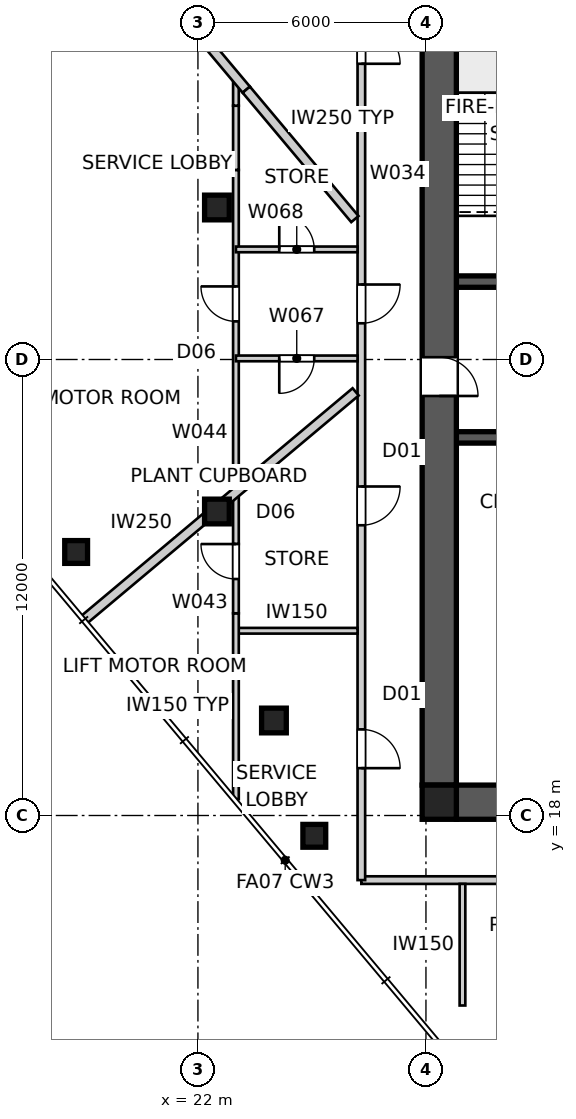
"""IFC4 building model, lengths in metres.
Left out: names, types, materials, properties, quantities, classifications, styles, units other than length and angle.
Written with IfcOpenShell. Run it as: python <this file> out.ifc"""

import sys

from ifc_helpers import new_model, si_unit, direction, frame, frame_2d, origin, origin_2d, place, context, subcontext, project, spatial, polyline, rectangle, outline, extrude, element, fill, save


model = new_model("IFC4")
c1 = context("Model", 3, precision=1e-05, world=origin(), true_north=direction((0.0, 1.0)))
c2 = subcontext(c1, "Body", "Model", "MODEL_VIEW")
j1 = project(units=[si_unit("LENGTHUNIT", "METRE"), si_unit("PLANEANGLEUNIT", "RADIAN")], contexts=[c1])
p1 = place(None, origin())
s1 = spatial("IfcSite", under=j1, at=p1, CompositionType="ELEMENT")
p2 = place(p1, origin())
s2 = spatial("IfcBuilding", under=s1, at=p2, CompositionType="ELEMENT")
p3 = place(p2, frame((0.0, 0.0, 304.3)))
s3 = spatial("IfcBuildingStorey", under=s2, at=p3, CompositionType="ELEMENT", Elevation=304.3)
p4 = place(p3, frame((51.2, 18.35, 0.0), z_axis=(0.0, 0.0, 1.0), x_axis=(-1.0, 0.0, 0.0)))
e1 = element("IfcWall", 1, at=p4, inside=s3, PredefinedType="SHEAR", context=c2, shape_type="SweptSolid", body=[
    extrude(outline(polyline([(0.0, -0.45), (22.4, -0.45), (22.4, -0.025), (22.85, -0.025), (22.85, 0.025), (22.4, 0.025), (22.4, 0.45), (0.0, 0.45), (0.0, 0.025), (-0.45, 0.025), (-0.45, -0.025), (0.0, -0.025), (0.0, -0.45)])), origin(), (0.0, 0.0, 1.0), 4.5),
])
p5 = place(p3, frame((28.35, 41.2, 0.0), z_axis=(0.0, 0.0, 1.0), x_axis=(0.0, -1.0, 0.0)))
e2 = element("IfcWall", 2, at=p5, inside=s3, PredefinedType="SHEAR", context=c2, shape_type="SweptSolid", body=[
    extrude(outline(polyline([(0.0, -0.45), (22.4, -0.45), (22.4, -0.025), (22.85, -0.025), (22.85, 0.025), (22.4, 0.025), (22.4, 0.45), (0.0, 0.45), (0.0, 0.025), (-0.45, 0.025), (-0.45, -0.025), (0.0, -0.025), (0.0, -0.45)])), origin(), (0.0, 0.0, 1.0), 4.5),
])
p6 = place(p5, frame((11.14, 0.0, 0.0)))
e3 = element("IfcOpeningElement", 3, at=p6, cuts=e2, PredefinedType="OPENING", context=c2, shape_type="SweptSolid", body=[
    extrude(rectangle(XDim=1.02, YDim=2.4, at=frame_2d((0.51, 1.2))), frame((0.0, 0.46, 0.0), z_axis=(0.0, -1.0, 0.0), x_axis=(1.0, 0.0, 0.0)), (0.0, 0.0, 1.0), 0.92),
])
p7 = place(p3, frame((28.8, 32.05, 0.0), z_axis=(0.0, 0.0, 1.0), x_axis=(1.0, 0.0, 0.0)))
e4 = element("IfcWall", 4, at=p7, inside=s3, PredefinedType="SHEAR", context=c2, shape_type="SweptSolid", body=[
    extrude(rectangle(XDim=22.4, YDim=0.3, at=frame_2d((11.2, 0.0))), origin(), (0.0, 0.0, 1.0), 4.5),
])
p8 = place(p7, frame((19.04, 0.0, 0.0)))
e5 = element("IfcOpeningElement", 5, at=p8, cuts=e4, PredefinedType="OPENING", context=c2, shape_type="SweptSolid", body=[
    extrude(rectangle(XDim=0.92, YDim=2.1, at=frame_2d((0.46, 1.05))), frame((0.0, 0.16, 0.0), z_axis=(0.0, -1.0, 0.0), x_axis=(1.0, 0.0, 0.0)), (0.0, 0.0, 1.0), 0.32),
])
p9 = place(p7, frame((1.265, 0.0, 0.0)))
e6 = element("IfcOpeningElement", 6, at=p9, cuts=e4, PredefinedType="OPENING", context=c2, shape_type="SweptSolid", body=[
    extrude(rectangle(XDim=1.02, YDim=2.1, at=frame_2d((0.51, 1.05))), frame((0.0, 0.16, 0.0), z_axis=(0.0, -1.0, 0.0), x_axis=(1.0, 0.0, 0.0)), (0.0, 0.0, 1.0), 0.32),
])
p10 = place(p7, frame((4.015, 0.0, 0.0)))
e7 = element("IfcOpeningElement", 7, at=p10, cuts=e4, PredefinedType="OPENING", context=c2, shape_type="SweptSolid", body=[
    extrude(rectangle(XDim=0.92, YDim=2.1, at=frame_2d((0.46, 1.05))), frame((0.0, 0.16, 0.0), z_axis=(0.0, -1.0, 0.0), x_axis=(1.0, 0.0, 0.0)), (0.0, 0.0, 1.0), 0.32),
])
p11 = place(p7, frame((6.565, 0.0, 0.0)))
e8 = element("IfcOpeningElement", 8, at=p11, cuts=e4, PredefinedType="OPENING", context=c2, shape_type="SweptSolid", body=[
    extrude(rectangle(XDim=0.92, YDim=2.1, at=frame_2d((0.46, 1.05))), frame((0.0, 0.16, 0.0), z_axis=(0.0, -1.0, 0.0), x_axis=(1.0, 0.0, 0.0)), (0.0, 0.0, 1.0), 0.32),
])
p12 = place(p7, frame((8.89, 0.0, 0.0)))
e9 = element("IfcOpeningElement", 9, at=p12, cuts=e4, PredefinedType="OPENING", context=c2, shape_type="SweptSolid", body=[
    extrude(rectangle(XDim=0.92, YDim=2.1, at=frame_2d((0.46, 1.05))), frame((0.0, 0.16, 0.0), z_axis=(0.0, -1.0, 0.0), x_axis=(1.0, 0.0, 0.0)), (0.0, 0.0, 1.0), 0.32),
])
p13 = place(p7, frame((12.59, 0.0, 0.0)))
e10 = element("IfcOpeningElement", 10, at=p13, cuts=e4, PredefinedType="OPENING", context=c2, shape_type="SweptSolid", body=[
    extrude(rectangle(XDim=0.92, YDim=2.1, at=frame_2d((0.46, 1.05))), frame((0.0, 0.16, 0.0), z_axis=(0.0, -1.0, 0.0), x_axis=(1.0, 0.0, 0.0)), (0.0, 0.0, 1.0), 0.32),
])
p14 = place(p7, frame((14.85, 0.0, 0.0)))
e11 = element("IfcOpeningElement", 11, at=p14, cuts=e4, PredefinedType="OPENING", context=c2, shape_type="SweptSolid", body=[
    extrude(rectangle(XDim=1.1, YDim=2.1, at=frame_2d((0.55, 1.05))), frame((0.0, 0.16, 0.0), z_axis=(0.0, -1.0, 0.0), x_axis=(1.0, 0.0, 0.0)), (0.0, 0.0, 1.0), 0.32),
])
p15 = place(p3, frame((51.2, 27.95, 0.0), z_axis=(0.0, 0.0, 1.0), x_axis=(-1.0, 0.0, 0.0)))
e12 = element("IfcWall", 12, at=p15, inside=s3, PredefinedType="SHEAR", context=c2, shape_type="SweptSolid", body=[
    extrude(rectangle(XDim=22.4, YDim=0.3, at=frame_2d((11.2, 0.0))), origin(), (0.0, 0.0, 1.0), 4.5),
])
p16 = place(p15, frame((19.04, 0.0, 0.0)))
e13 = element("IfcOpeningElement", 13, at=p16, cuts=e12, PredefinedType="OPENING", context=c2, shape_type="SweptSolid", body=[
    extrude(rectangle(XDim=0.92, YDim=2.1, at=frame_2d((0.46, 1.05))), frame((0.0, 0.16, 0.0), z_axis=(0.0, -1.0, 0.0), x_axis=(1.0, 0.0, 0.0)), (0.0, 0.0, 1.0), 0.32),
])
p17 = place(p15, frame((1.265, 0.0, 0.0)))
e14 = element("IfcOpeningElement", 14, at=p17, cuts=e12, PredefinedType="OPENING", context=c2, shape_type="SweptSolid", body=[
    extrude(rectangle(XDim=1.02, YDim=2.1, at=frame_2d((0.51, 1.05))), frame((0.0, 0.16, 0.0), z_axis=(0.0, -1.0, 0.0), x_axis=(1.0, 0.0, 0.0)), (0.0, 0.0, 1.0), 0.32),
])
p18 = place(p15, frame((4.015, 0.0, 0.0)))
e15 = element("IfcOpeningElement", 15, at=p18, cuts=e12, PredefinedType="OPENING", context=c2, shape_type="SweptSolid", body=[
    extrude(rectangle(XDim=0.92, YDim=2.1, at=frame_2d((0.46, 1.05))), frame((0.0, 0.16, 0.0), z_axis=(0.0, -1.0, 0.0), x_axis=(1.0, 0.0, 0.0)), (0.0, 0.0, 1.0), 0.32),
])
p19 = place(p15, frame((12.59, 0.0, 0.0)))
e16 = element("IfcOpeningElement", 16, at=p19, cuts=e12, PredefinedType="OPENING", context=c2, shape_type="SweptSolid", body=[
    extrude(rectangle(XDim=0.92, YDim=2.1, at=frame_2d((0.46, 1.05))), frame((0.0, 0.16, 0.0), z_axis=(0.0, -1.0, 0.0), x_axis=(1.0, 0.0, 0.0)), (0.0, 0.0, 1.0), 0.32),
])
p20 = place(p15, frame((8.89, 0.0, 0.0)))
e17 = element("IfcOpeningElement", 17, at=p20, cuts=e12, PredefinedType="OPENING", context=c2, shape_type="SweptSolid", body=[
    extrude(rectangle(XDim=0.92, YDim=2.1, at=frame_2d((0.46, 1.05))), frame((0.0, 0.16, 0.0), z_axis=(0.0, -1.0, 0.0), x_axis=(1.0, 0.0, 0.0)), (0.0, 0.0, 1.0), 0.32),
])
p21 = place(p15, frame((6.565, 0.0, 0.0)))
e18 = element("IfcOpeningElement", 18, at=p21, cuts=e12, PredefinedType="OPENING", context=c2, shape_type="SweptSolid", body=[
    extrude(rectangle(XDim=0.92, YDim=2.1, at=frame_2d((0.46, 1.05))), frame((0.0, 0.16, 0.0), z_axis=(0.0, -1.0, 0.0), x_axis=(1.0, 0.0, 0.0)), (0.0, 0.0, 1.0), 0.32),
])
p22 = place(p15, frame((14.85, 0.0, 0.0)))
e19 = element("IfcOpeningElement", 19, at=p22, cuts=e12, PredefinedType="OPENING", context=c2, shape_type="SweptSolid", body=[
    extrude(rectangle(XDim=1.1, YDim=2.1, at=frame_2d((0.55, 1.05))), frame((0.0, 0.16, 0.0), z_axis=(0.0, -1.0, 0.0), x_axis=(1.0, 0.0, 0.0)), (0.0, 0.0, 1.0), 0.32),
])
p23 = place(p3, frame((28.35, 18.35, 0.0), z_axis=(0.0, 0.0, 1.0), x_axis=(1.0, 0.0, 0.0)))
e20 = element("IfcColumn", 20, at=p23, inside=s3, PredefinedType="COLUMN", context=c2, shape_type="SweptSolid", body=[
    extrude(rectangle(XDim=0.9, YDim=0.9, at=origin_2d()), origin(), (0.0, 0.0, 1.0), 4.5),
])
for number, where, z_axis, x_axis in (
    (21, (18.795, 24.935, 0.0), (0.0, 0.0, 1.0), (1.0, 0.0, 0.0)),
    (22, (25.062, 17.466, 0.0), (0.0, 0.0, 1.0), (1.0, 0.0, 0.0)),
):
    element("IfcColumn", number, at=place(p3, frame(where, z_axis=z_axis, x_axis=x_axis)), inside=s3, PredefinedType="COLUMN", context=c2, shape_type="SweptSolid", body=[
        extrude(rectangle(XDim=0.6, YDim=0.6, at=origin_2d()), origin(), (0.0, 0.0, 1.0), 4.5),
    ])
for number, where, z_axis, x_axis in (
    (23, (22.5, 34.0, 0.0), (0.0, 0.0, 1.0), (1.0, 0.0, 0.0)),
    (24, (22.5, 26.0, 0.0), (0.0, 0.0, 1.0), (1.0, 0.0, 0.0)),
    (25, (24.0, 20.5, 0.0), (0.0, 0.0, 1.0), (1.0, 0.0, 0.0)),
):
    element("IfcColumn", number, at=place(p3, frame(where, z_axis=z_axis, x_axis=x_axis)), inside=s3, PredefinedType="COLUMN", context=c2, shape_type="SweptSolid", body=[
        extrude(rectangle(XDim=0.65, YDim=0.65, at=origin_2d()), origin(), (0.0, 0.0, 1.0), 4.5),
    ])
p24 = place(p3, frame((26.3, 16.3, 0.0), z_axis=(0.0, 0.0, 1.0), x_axis=(1.0, 0.0, 0.0)))
e26 = element("IfcWall", 26, at=p24, inside=s3, PredefinedType="PARTITIONING", context=c2, shape_type="SweptSolid", body=[
    extrude(rectangle(XDim=27.4, YDim=0.2, at=frame_2d((13.7, 0.0))), origin(), (0.0, 0.0, 1.0), 4.25),
])
p25 = place(p24, frame((22.126, 0.0, 0.0)))
e27 = element("IfcOpeningElement", 27, at=p25, cuts=e26, PredefinedType="OPENING", context=c2, shape_type="SweptSolid", body=[
    extrude(rectangle(XDim=1.02, YDim=2.34, at=frame_2d((0.51, 1.17))), frame((0.0, 0.11, 0.0), z_axis=(0.0, -1.0, 0.0), x_axis=(1.0, 0.0, 0.0)), (0.0, 0.0, 1.0), 0.22),
])
p26 = place(p24, frame((13.395, 0.0, 0.0)))
e28 = element("IfcOpeningElement", 28, at=p26, cuts=e26, PredefinedType="OPENING", context=c2, shape_type="SweptSolid", body=[
    extrude(rectangle(XDim=1.02, YDim=2.34, at=frame_2d((0.51, 1.17))), frame((0.0, 0.11, 0.0), z_axis=(0.0, -1.0, 0.0), x_axis=(1.0, 0.0, 0.0)), (0.0, 0.0, 1.0), 0.22),
])
p27 = place(p24, frame((6.053, 0.0, 0.0)))
e29 = element("IfcOpeningElement", 29, at=p27, cuts=e26, PredefinedType="OPENING", context=c2, shape_type="SweptSolid", body=[
    extrude(rectangle(XDim=1.02, YDim=2.34, at=frame_2d((0.51, 1.17))), frame((0.0, 0.11, 0.0), z_axis=(0.0, -1.0, 0.0), x_axis=(1.0, 0.0, 0.0)), (0.0, 0.0, 1.0), 0.22),
])
p28 = place(p3, frame((26.3, 43.7, 0.0), z_axis=(0.0, 0.0, 1.0), x_axis=(0.0, -1.0, 0.0)))
e30 = element("IfcWall", 30, at=p28, inside=s3, PredefinedType="PARTITIONING", context=c2, shape_type="SweptSolid", body=[
    extrude(rectangle(XDim=27.4, YDim=0.2, at=frame_2d((13.7, 0.0))), origin(), (0.0, 0.0, 1.0), 4.25),
])
p29 = place(p28, frame((4.898, 0.0, 0.0)))
e31 = element("IfcOpeningElement", 31, at=p29, cuts=e30, PredefinedType="OPENING", context=c2, shape_type="SweptSolid", body=[
    extrude(rectangle(XDim=1.02, YDim=2.34, at=frame_2d((0.51, 1.17))), frame((0.0, 0.11, 0.0), z_axis=(0.0, -1.0, 0.0), x_axis=(1.0, 0.0, 0.0)), (0.0, 0.0, 1.0), 0.22),
])
p30 = place(p28, frame((17.042, 0.0, 0.0)))
e32 = element("IfcOpeningElement", 32, at=p30, cuts=e30, PredefinedType="OPENING", context=c2, shape_type="SweptSolid", body=[
    extrude(rectangle(XDim=1.02, YDim=2.34, at=frame_2d((0.51, 1.17))), frame((0.0, 0.11, 0.0), z_axis=(0.0, -1.0, 0.0), x_axis=(1.0, 0.0, 0.0)), (0.0, 0.0, 1.0), 0.22),
])
p31 = place(p28, frame((23.434, 0.0, 0.0)))
e33 = element("IfcOpeningElement", 33, at=p31, cuts=e30, PredefinedType="OPENING", context=c2, shape_type="SweptSolid", body=[
    extrude(rectangle(XDim=1.02, YDim=2.34, at=frame_2d((0.51, 1.17))), frame((0.0, 0.11, 0.0), z_axis=(0.0, -1.0, 0.0), x_axis=(1.0, 0.0, 0.0)), (0.0, 0.0, 1.0), 0.22),
])
p32 = place(p28, frame((11.727, 0.0, 0.0)))
e34 = element("IfcOpeningElement", 34, at=p32, cuts=e30, PredefinedType="OPENING", context=c2, shape_type="SweptSolid", body=[
    extrude(rectangle(XDim=1.02, YDim=2.34, at=frame_2d((0.51, 1.17))), frame((0.0, 0.11, 0.0), z_axis=(0.0, -1.0, 0.0), x_axis=(1.0, 0.0, 0.0)), (0.0, 0.0, 1.0), 0.22),
])
p33 = place(p3, frame((21.146, 39.635, 0.0), z_axis=(0.0, 0.0, 1.0), x_axis=(0.642823301165, -0.766014492995, 0.0)))
e35 = element("IfcWall", 35, at=p33, inside=s3, PredefinedType="PARTITIONING", context=c2, shape_type="SweptSolid", body=[
    extrude(rectangle(XDim=3.308, YDim=0.25, at=frame_2d((1.654, 0.0))), origin(), (0.0, 0.0, 1.0), 3.638),
])
p34 = place(p3, frame((23.272, 37.101, 0.0), z_axis=(0.0, 0.0, 1.0), x_axis=(0.642778620996, -0.766051985436, 0.0)))
e36 = element("IfcWall", 36, at=p34, inside=s3, PredefinedType="PARTITIONING", context=c2, shape_type="SweptSolid", body=[
    extrude(rectangle(XDim=4.446, YDim=0.25, at=frame_2d((2.223, 0.0))), origin(), (0.0, 0.0, 1.0), 4.25),
])
p35 = place(p3, frame((18.993, 23.143, 0.0), z_axis=(0.0, 0.0, 1.0), x_axis=(0.766045019392, 0.64278692291, 0.0)))
e37 = element("IfcWall", 37, at=p35, inside=s3, PredefinedType="PARTITIONING", context=c2, shape_type="SweptSolid", body=[
    extrude(rectangle(XDim=9.343, YDim=0.25, at=frame_2d((4.671, 0.0))), origin(), (0.0, 0.0, 1.0), 4.25),
])
for number, where, z_axis, x_axis in (
    (38, (28.961, 16.2, 0.0), (0.0, 0.0, 1.0), (0.0, -1.0, 0.0)),
    (39, (23.0, 22.862, 0.0), (0.0, 0.0, 1.0), (1.0, 0.0, 0.0)),
):
    element("IfcWall", number, at=place(p3, frame(where, z_axis=z_axis, x_axis=x_axis)), inside=s3, PredefinedType="SOLIDWALL", context=c2, shape_type="SweptSolid", body=[
        extrude(rectangle(XDim=3.2, YDim=0.15, at=frame_2d((1.6, 0.0))), origin(), (0.0, 0.0, 1.0), 4.25),
    ])
p36 = place(p3, frame((23.0, 18.43, 0.0), z_axis=(0.0, 0.0, 1.0), x_axis=(0.0, 1.0, 0.0)))
e40 = element("IfcWall", 40, at=p36, inside=s3, PredefinedType="SOLIDWALL", context=c2, shape_type="SweptSolid", body=[
    extrude(rectangle(XDim=4.892, YDim=0.15, at=frame_2d((2.446, 0.0))), origin(), (0.0, 0.0, 1.0), 4.25),
])
p37 = place(p3, frame((23.0, 23.322, 0.0), z_axis=(0.0, 0.0, 1.0), x_axis=(0.0, 1.0, 0.0)))
e41 = element("IfcWall", 41, at=p37, inside=s3, PredefinedType="SOLIDWALL", context=c2, shape_type="SweptSolid", body=[
    extrude(rectangle(XDim=1.822, YDim=0.15, at=frame_2d((0.911, 0.0))), origin(), (0.0, 0.0, 1.0), 3.25),
])
p38 = place(p37, frame((0.902, 0.0, 0.0)))
e42 = element("IfcOpeningElement", 42, at=p38, cuts=e41, PredefinedType="OPENING", context=c2, shape_type="SweptSolid", body=[
    extrude(rectangle(XDim=0.92, YDim=2.1, at=frame_2d((0.46, 1.05))), frame((0.0, 0.085, 0.0), z_axis=(0.0, -1.0, 0.0), x_axis=(1.0, 0.0, 0.0)), (0.0, 0.0, 1.0), 0.17),
])
p39 = place(p3, frame((23.0, 25.143, 0.0), z_axis=(0.0, 0.0, 1.0), x_axis=(0.0, 1.0, 0.0)))
e43 = element("IfcWall", 43, at=p39, inside=s3, PredefinedType="SOLIDWALL", context=c2, shape_type="SweptSolid", body=[
    extrude(rectangle(XDim=9.845, YDim=0.15, at=frame_2d((4.922, 0.0))), origin(), (0.0, 0.0, 1.0), 4.25),
])
p40 = place(p39, frame((5.86, 0.0, 0.0)))
e44 = element("IfcOpeningElement", 44, at=p40, cuts=e43, PredefinedType="OPENING", context=c2, shape_type="SweptSolid", body=[
    extrude(rectangle(XDim=0.92, YDim=2.1, at=frame_2d((0.46, 1.05))), frame((0.0, 0.085, 0.0), z_axis=(0.0, -1.0, 0.0), x_axis=(1.0, 0.0, 0.0)), (0.0, 0.0, 1.0), 0.17),
])
p41 = place(p3, frame((23.0, 34.988, 0.0), z_axis=(0.0, 0.0, 1.0), x_axis=(0.0, 1.0, 0.0)))
e45 = element("IfcWall", 45, at=p41, inside=s3, PredefinedType="SOLIDWALL", context=c2, shape_type="SweptSolid", body=[
    extrude(rectangle(XDim=1.69, YDim=0.15, at=frame_2d((0.845, 0.0))), origin(), (0.0, 0.0, 1.0), 3.25),
])
p42 = place(p3, frame((23.0, 36.678, 0.0), z_axis=(0.0, 0.0, 1.0), x_axis=(0.0, 1.0, 0.0)))
e46 = element("IfcWall", 46, at=p42, inside=s3, PredefinedType="SOLIDWALL", context=c2, shape_type="SweptSolid", body=[
    extrude(rectangle(XDim=0.747, YDim=0.15, at=frame_2d((0.373, 0.0))), origin(), (0.0, 0.0, 1.0), 4.25),
])
p43 = place(p3, frame((26.2, 30.029, 0.0), z_axis=(0.0, 0.0, 1.0), x_axis=(-1.0, 0.0, 0.0)))
e47 = element("IfcWall", 47, at=p43, inside=s3, PredefinedType="SOLIDWALL", context=c2, shape_type="SweptSolid", body=[
    extrude(rectangle(XDim=3.2, YDim=0.15, at=frame_2d((1.6, 0.0))), origin(), (0.0, 0.0, 1.0), 3.722),
])
p44 = place(p43, frame((1.14, 0.0, 0.0)))
e48 = element("IfcOpeningElement", 48, at=p44, cuts=e47, PredefinedType="OPENING", context=c2, shape_type="SweptSolid", body=[
    extrude(rectangle(XDim=0.92, YDim=2.1, at=frame_2d((0.46, 1.05))), frame((0.0, 0.085, 0.0), z_axis=(0.0, -1.0, 0.0), x_axis=(1.0, 0.0, 0.0)), (0.0, 0.0, 1.0), 0.17),
])
p45 = place(p3, frame((23.0, 32.897, 0.0), z_axis=(0.0, 0.0, 1.0), x_axis=(1.0, 0.0, 0.0)))
e49 = element("IfcWall", 49, at=p45, inside=s3, PredefinedType="SOLIDWALL", context=c2, shape_type="SweptSolid", body=[
    extrude(rectangle(XDim=3.2, YDim=0.15, at=frame_2d((1.6, 0.0))), origin(), (0.0, 0.0, 1.0), 3.722),
])
p46 = place(p45, frame((1.14, 0.0, 0.0)))
e50 = element("IfcOpeningElement", 50, at=p46, cuts=e49, PredefinedType="OPENING", context=c2, shape_type="SweptSolid", body=[
    extrude(rectangle(XDim=0.92, YDim=2.1, at=frame_2d((0.46, 1.05))), frame((0.0, 0.085, 0.0), z_axis=(0.0, -1.0, 0.0), x_axis=(1.0, 0.0, 0.0)), (0.0, 0.0, 1.0), 0.17),
])
p47 = place(p29, origin())
e51 = element("IfcDoor", 51, at=p47, inside=s3, OperationType="SINGLE_SWING_RIGHT", PredefinedType="DOOR", context=c2, shape_type="SweptSolid", body=[
    extrude(rectangle(XDim=1.02, YDim=2.34, at=frame_2d((0.51, 1.17))), frame((0.0, 0.025, 0.0), z_axis=(0.0, -1.0, 0.0), x_axis=(1.0, 0.0, 0.0)), (0.0, 0.0, 1.0), 0.05),
])
fill(e31, e51)
p48 = place(p30, origin())
e52 = element("IfcDoor", 52, at=p48, inside=s3, OperationType="SINGLE_SWING_LEFT", PredefinedType="DOOR", context=c2, shape_type="SweptSolid", body=[
    extrude(rectangle(XDim=1.02, YDim=2.34, at=frame_2d((0.51, 1.17))), frame((0.0, 0.025, 0.0), z_axis=(0.0, -1.0, 0.0), x_axis=(1.0, 0.0, 0.0)), (0.0, 0.0, 1.0), 0.05),
])
fill(e32, e52)
p49 = place(p31, origin())
e53 = element("IfcDoor", 53, at=p49, inside=s3, OperationType="SINGLE_SWING_RIGHT", PredefinedType="DOOR", context=c2, shape_type="SweptSolid", body=[
    extrude(rectangle(XDim=1.02, YDim=2.34, at=frame_2d((0.51, 1.17))), frame((0.0, 0.025, 0.0), z_axis=(0.0, -1.0, 0.0), x_axis=(1.0, 0.0, 0.0)), (0.0, 0.0, 1.0), 0.05),
])
fill(e33, e53)
p50 = place(p32, origin())
e54 = element("IfcDoor", 54, at=p50, inside=s3, OperationType="SINGLE_SWING_LEFT", PredefinedType="DOOR", context=c2, shape_type="SweptSolid", body=[
    extrude(rectangle(XDim=1.02, YDim=2.34, at=frame_2d((0.51, 1.17))), frame((0.0, 0.025, 0.0), z_axis=(0.0, -1.0, 0.0), x_axis=(1.0, 0.0, 0.0)), (0.0, 0.0, 1.0), 0.05),
])
fill(e34, e54)
p51 = place(p38, origin())
e55 = element("IfcDoor", 55, at=p51, inside=s3, OperationType="SINGLE_SWING_RIGHT", PredefinedType="DOOR", context=c2, shape_type="SweptSolid", body=[
    extrude(rectangle(XDim=0.92, YDim=2.1, at=frame_2d((0.46, 1.05))), frame((0.0, 0.025, 0.0), z_axis=(0.0, -1.0, 0.0), x_axis=(1.0, 0.0, 0.0)), (0.0, 0.0, 1.0), 0.05),
])
fill(e42, e55)
p52 = place(p44, origin())
e56 = element("IfcDoor", 56, at=p52, inside=s3, OperationType="SINGLE_SWING_RIGHT", PredefinedType="DOOR", context=c2, shape_type="SweptSolid", body=[
    extrude(rectangle(XDim=0.92, YDim=2.1, at=frame_2d((0.46, 1.05))), frame((0.0, 0.025, 0.0), z_axis=(0.0, -1.0, 0.0), x_axis=(1.0, 0.0, 0.0)), (0.0, 0.0, 1.0), 0.05),
])
fill(e48, e56)
p53 = place(p46, origin())
e57 = element("IfcDoor", 57, at=p53, inside=s3, OperationType="SINGLE_SWING_LEFT", PredefinedType="DOOR", context=c2, shape_type="SweptSolid", body=[
    extrude(rectangle(XDim=0.92, YDim=2.1, at=frame_2d((0.46, 1.05))), frame((0.0, 0.025, 0.0), z_axis=(0.0, -1.0, 0.0), x_axis=(1.0, 0.0, 0.0)), (0.0, 0.0, 1.0), 0.05),
])
fill(e50, e57)
p54 = place(p40, origin())
e58 = element("IfcDoor", 58, at=p54, inside=s3, OperationType="SINGLE_SWING_RIGHT", PredefinedType="DOOR", context=c2, shape_type="SweptSolid", body=[
    extrude(rectangle(XDim=0.92, YDim=2.1, at=frame_2d((0.46, 1.05))), frame((0.0, 0.025, 0.0), z_axis=(0.0, -1.0, 0.0), x_axis=(1.0, 0.0, 0.0)), (0.0, 0.0, 1.0), 0.05),
])
fill(e44, e58)
p55 = place(p6, origin())
e59 = element("IfcDoor", 59, at=p55, inside=s3, OperationType="SINGLE_SWING_RIGHT", PredefinedType="DOOR", context=c2, shape_type="SweptSolid", body=[
    extrude(rectangle(XDim=1.02, YDim=2.4, at=frame_2d((0.51, 1.2))), frame((0.0, 0.025, 0.0), z_axis=(0.0, -1.0, 0.0), x_axis=(1.0, 0.0, 0.0)), (0.0, 0.0, 1.0), 0.05),
])
fill(e3, e59)
save(model, sys.argv[1])
